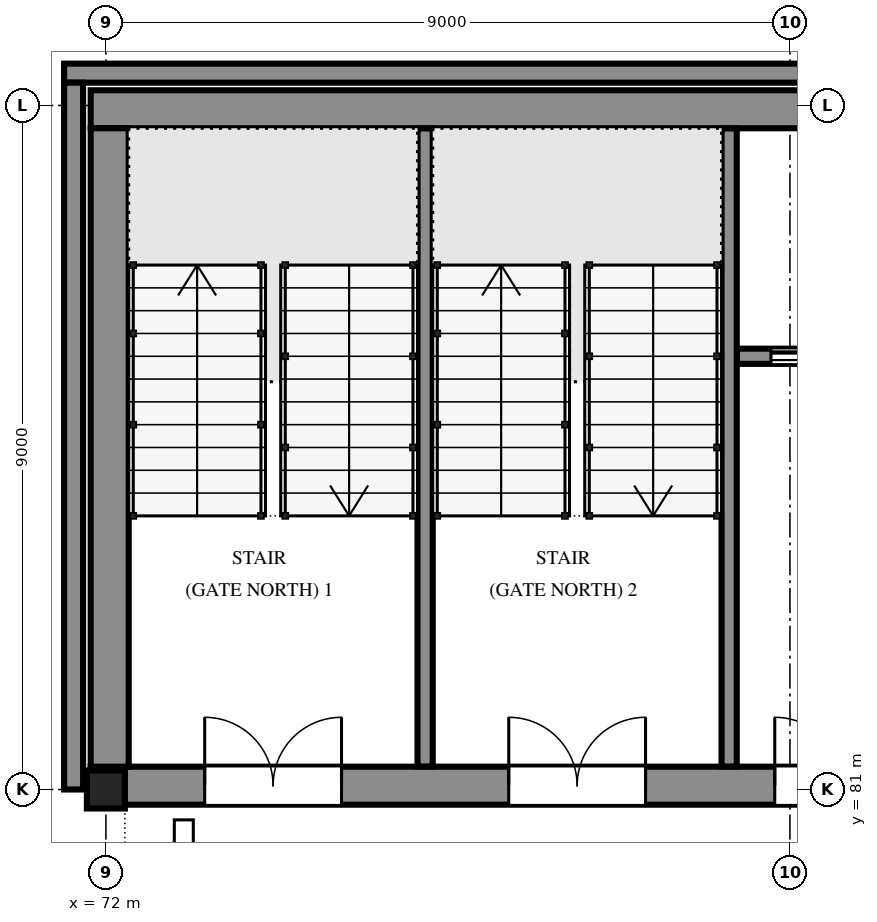
"""IFC4 building model, lengths in metres.
Left out: names, types, materials, properties, quantities, classifications, styles, units other than length and angle.
Written with IfcOpenShell. Run it as: python <this file> out.ifc"""

import sys

from ifc_helpers import new_model, si_unit, direction, frame, frame_2d, origin, origin_2d, place, context, subcontext, project, spatial, polyline, rectangle, hollow_rectangle, outline, extrude, element, fill, save


model = new_model("IFC4")
c1 = context("Model", 3, precision=1e-05, world=origin(), true_north=direction((0.0, 1.0)))
c2 = subcontext(c1, "Body", "Model", "MODEL_VIEW")
j1 = project(units=[si_unit("LENGTHUNIT", "METRE"), si_unit("PLANEANGLEUNIT", "RADIAN")], contexts=[c1])
p1 = place(None, origin())
s1 = spatial("IfcSite", under=j1, at=p1, CompositionType="ELEMENT")
p2 = place(p1, origin())
s2 = spatial("IfcBuilding", under=s1, at=p2, CompositionType="ELEMENT")
p3 = place(p2, frame((0.0, 0.0, 15.9)))
s3 = spatial("IfcBuildingStorey", under=s2, at=p3, CompositionType="ELEMENT", Elevation=15.9)
p4 = place(p3, frame((72.0, 81.0, 0.0), z_axis=(0.0, 0.0, 1.0), x_axis=(1.0, 0.0, 0.0)))
e1 = element("IfcColumn", 1, at=p4, inside=s3, PredefinedType="COLUMN", context=c2, shape_type="SweptSolid", body=[
    extrude(hollow_rectangle(XDim=0.5, YDim=0.5, WallThickness=0.032, at=origin_2d()), origin(), (0.0, 0.0, 1.0), 4.2),
])
p5 = place(p3, frame((71.8, 81.05, 0.0), z_axis=(0.0, 0.0, 1.0), x_axis=(1.0, 0.0, 0.0)))
e2 = element("IfcWall", 2, at=p5, inside=s3, PredefinedType="SOLIDWALL", context=c2, shape_type="SweptSolid", body=[
    extrude(rectangle(XDim=18.4, YDim=0.5, at=frame_2d((9.2, 0.0))), origin(), (0.0, 0.0, 1.0), 4.2),
])
p6 = place(p5, frame((1.5, 0.0, 0.0)))
e3 = element("IfcOpeningElement", 3, at=p6, cuts=e2, PredefinedType="OPENING", context=c2, shape_type="SweptSolid", body=[
    extrude(rectangle(XDim=1.8, YDim=2.1, at=frame_2d((0.9, 1.05))), frame((0.0, 0.26, 0.0), z_axis=(0.0, -1.0, 0.0), x_axis=(1.0, 0.0, 0.0)), (0.0, 0.0, 1.0), 0.52),
])
p7 = place(p5, frame((5.5, 0.0, 0.0)))
e4 = element("IfcOpeningElement", 4, at=p7, cuts=e2, PredefinedType="OPENING", context=c2, shape_type="SweptSolid", body=[
    extrude(rectangle(XDim=1.8, YDim=2.1, at=frame_2d((0.9, 1.05))), frame((0.0, 0.26, 0.0), z_axis=(0.0, -1.0, 0.0), x_axis=(1.0, 0.0, 0.0)), (0.0, 0.0, 1.0), 0.52),
])
p8 = place(p5, frame((9.0, 0.0, 0.0)))
e5 = element("IfcOpeningElement", 5, at=p8, cuts=e2, PredefinedType="OPENING", context=c2, shape_type="SweptSolid", body=[
    extrude(rectangle(XDim=1.8, YDim=2.1, at=frame_2d((0.9, 1.05))), frame((0.0, 0.26, 0.0), z_axis=(0.0, -1.0, 0.0), x_axis=(1.0, 0.0, 0.0)), (0.0, 0.0, 1.0), 0.52),
])
p9 = place(p5, frame((16.15, 0.0, 0.0)))
e6 = element("IfcOpeningElement", 6, at=p9, cuts=e2, PredefinedType="OPENING", context=c2, shape_type="SweptSolid", body=[
    extrude(rectangle(XDim=0.9, YDim=2.1, at=frame_2d((0.45, 1.05))), frame((0.0, 0.26, 0.0), z_axis=(0.0, -1.0, 0.0), x_axis=(1.0, 0.0, 0.0)), (0.0, 0.0, 1.0), 0.52),
])
p10 = place(p3, frame((71.8, 89.95, 0.0), z_axis=(0.0, 0.0, 1.0), x_axis=(1.0, 0.0, 0.0)))
e7 = element("IfcWall", 7, at=p10, inside=s3, PredefinedType="SOLIDWALL", context=c2, shape_type="SweptSolid", body=[
    extrude(rectangle(XDim=18.4, YDim=0.5, at=frame_2d((9.2, 0.0))), origin(), (0.0, 0.0, 1.0), 4.2),
])
p11 = place(p3, frame((72.05, 81.3, 0.0), z_axis=(0.0, 0.0, 1.0), x_axis=(0.0, 1.0, 0.0)))
e8 = element("IfcWall", 8, at=p11, inside=s3, PredefinedType="SOLIDWALL", context=c2, shape_type="SweptSolid", body=[
    extrude(rectangle(XDim=8.4, YDim=0.5, at=frame_2d((4.2, 0.0))), origin(), (0.0, 0.0, 1.0), 4.2),
])
for number, where, z_axis, x_axis in (
    (9, (76.2, 81.302, -0.15), (0.0, 0.0, 1.0), (0.0, 1.0, 0.0)),
    (10, (80.2, 81.302, -0.15), (0.0, 0.0, 1.0), (0.0, 1.0, 0.0)),
):
    element("IfcWall", number, at=place(p3, frame(where, z_axis=z_axis, x_axis=x_axis)), inside=s3, PredefinedType="SOLIDWALL", context=c2, shape_type="SweptSolid", body=[
        extrude(rectangle(XDim=8.396, YDim=0.2, at=frame_2d((4.198, 0.0))), origin(), (0.0, 0.0, 1.0), 3.666),
    ])
p12 = place(p3, frame((80.302, 86.7, 0.0), z_axis=(0.0, 0.0, 1.0), x_axis=(1.0, 0.0, 0.0)))
e11 = element("IfcWall", 11, at=p12, inside=s3, PredefinedType="SOLIDWALL", context=c2, shape_type="SweptSolid", body=[
    extrude(rectangle(XDim=2.198, YDim=0.2, at=frame_2d((1.099, 0.0))), origin(), (0.0, 0.0, 1.0), 3.516),
])
p13 = place(p12, frame((0.448, 0.0, 0.0)))
e12 = element("IfcOpeningElement", 12, at=p13, cuts=e11, PredefinedType="OPENING", context=c2, shape_type="SweptSolid", body=[
    extrude(rectangle(XDim=1.1, YDim=2.1, at=frame_2d((0.55, 1.05))), frame((0.0, 0.11, 0.0), z_axis=(0.0, -1.0, 0.0), x_axis=(1.0, 0.0, 0.0)), (0.0, 0.0, 1.0), 0.22),
])
p14 = place(p13, origin())
e13 = element("IfcDoor", 13, at=p14, inside=s3, OperationType="SLIDING_TO_LEFT", PredefinedType="DOOR", context=c2, shape_type="SweptSolid", body=[
    extrude(outline(polyline([(0.0, 0.0), (0.07, 0.0), (0.07, 2.03), (1.03, 2.03), (1.03, 0.0), (1.1, 0.0), (1.1, 2.1), (0.0, 2.1), (0.0, 0.0)])), frame((0.0, 0.025, 0.0), z_axis=(0.0, -1.0, 0.0), x_axis=(1.0, 0.0, 0.0)), (0.0, 0.0, 1.0), 0.05),
    extrude(rectangle(XDim=0.524, YDim=2.016, at=frame_2d((0.336, 1.018))), frame((0.0, 0.018, 0.0), z_axis=(0.0, -1.0, 0.0), x_axis=(1.0, 0.0, 0.0)), (0.0, 0.0, 1.0), 0.016),
    extrude(rectangle(XDim=0.52, YDim=2.016, at=frame_2d((0.766, 1.018))), frame((0.0, -0.002, 0.0), z_axis=(0.0, -1.0, 0.0), x_axis=(1.0, 0.0, 0.0)), (0.0, 0.0, 1.0), 0.016),
])
fill(e12, e13)
p15 = place(p6, origin())
e14 = element("IfcDoor", 14, at=p15, inside=s3, OperationType="DOUBLE_DOOR_SINGLE_SWING", PredefinedType="DOOR", context=c2, shape_type="SweptSolid", body=[
    extrude(outline(polyline([(0.0, 0.0), (0.07, 0.0), (0.07, 2.03), (1.73, 2.03), (1.73, 0.0), (1.8, 0.0), (1.8, 2.1), (0.0, 2.1), (0.0, 0.0)])), frame((0.0, 0.025, 0.0), z_axis=(0.0, -1.0, 0.0), x_axis=(1.0, 0.0, 0.0)), (0.0, 0.0, 1.0), 0.05),
    extrude(outline(polyline([(0.074, 0.01), (0.897, 0.01), (0.897, 2.026), (0.074, 2.026), (0.074, 0.01)]), holes=[polyline([(0.194, 0.16), (0.777, 0.16), (0.777, 1.01), (0.194, 1.01), (0.194, 0.16)]), polyline([(0.335, 1.16), (0.635, 1.16), (0.635, 1.76), (0.335, 1.76), (0.335, 1.16)])]), frame((0.0, 0.017, 0.0), z_axis=(0.0, -1.0, 0.0), x_axis=(1.0, 0.0, 0.0)), (0.0, 0.0, 1.0), 0.035),
    extrude(rectangle(XDim=0.583, YDim=0.85, at=frame_2d((0.485, 0.585))), frame((0.0, 0.009, 0.0), z_axis=(0.0, -1.0, 0.0), x_axis=(1.0, 0.0, 0.0)), (0.0, 0.0, 1.0), 0.017),
    extrude(rectangle(XDim=0.3, YDim=0.6, at=frame_2d((0.485, 1.46))), frame((0.0, 0.006, 0.0), z_axis=(0.0, -1.0, 0.0), x_axis=(1.0, 0.0, 0.0)), (0.0, 0.0, 1.0), 0.012),
    extrude(outline(polyline([(0.903, 0.01), (1.726, 0.01), (1.726, 2.026), (0.903, 2.026), (0.903, 0.01)]), holes=[polyline([(1.023, 0.16), (1.606, 0.16), (1.606, 1.01), (1.023, 1.01), (1.023, 0.16)]), polyline([(1.165, 1.16), (1.465, 1.16), (1.465, 1.76), (1.165, 1.76), (1.165, 1.16)])]), frame((0.0, 0.017, 0.0), z_axis=(0.0, -1.0, 0.0), x_axis=(1.0, 0.0, 0.0)), (0.0, 0.0, 1.0), 0.035),
    extrude(rectangle(XDim=0.583, YDim=0.85, at=frame_2d((1.314, 0.585))), frame((0.0, 0.009, 0.0), z_axis=(0.0, -1.0, 0.0), x_axis=(1.0, 0.0, 0.0)), (0.0, 0.0, 1.0), 0.017),
    extrude(rectangle(XDim=0.3, YDim=0.6, at=frame_2d((1.314, 1.46))), frame((0.0, 0.006, 0.0), z_axis=(0.0, -1.0, 0.0), x_axis=(1.0, 0.0, 0.0)), (0.0, 0.0, 1.0), 0.012),
])
fill(e3, e14)
p16 = place(p7, origin())
e15 = element("IfcDoor", 15, at=p16, inside=s3, OperationType="DOUBLE_DOOR_SINGLE_SWING", PredefinedType="DOOR", context=c2, shape_type="SweptSolid", body=[
    extrude(outline(polyline([(0.0, 0.0), (0.07, 0.0), (0.07, 2.03), (1.73, 2.03), (1.73, 0.0), (1.8, 0.0), (1.8, 2.1), (0.0, 2.1), (0.0, 0.0)])), frame((0.0, 0.025, 0.0), z_axis=(0.0, -1.0, 0.0), x_axis=(1.0, 0.0, 0.0)), (0.0, 0.0, 1.0), 0.05),
    extrude(outline(polyline([(0.074, 0.01), (0.897, 0.01), (0.897, 2.026), (0.074, 2.026), (0.074, 0.01)]), holes=[polyline([(0.194, 0.16), (0.777, 0.16), (0.777, 1.01), (0.194, 1.01), (0.194, 0.16)]), polyline([(0.335, 1.16), (0.635, 1.16), (0.635, 1.76), (0.335, 1.76), (0.335, 1.16)])]), frame((0.0, 0.017, 0.0), z_axis=(0.0, -1.0, 0.0), x_axis=(1.0, 0.0, 0.0)), (0.0, 0.0, 1.0), 0.035),
    extrude(rectangle(XDim=0.583, YDim=0.85, at=frame_2d((0.485, 0.585))), frame((0.0, 0.009, 0.0), z_axis=(0.0, -1.0, 0.0), x_axis=(1.0, 0.0, 0.0)), (0.0, 0.0, 1.0), 0.017),
    extrude(rectangle(XDim=0.3, YDim=0.6, at=frame_2d((0.485, 1.46))), frame((0.0, 0.006, 0.0), z_axis=(0.0, -1.0, 0.0), x_axis=(1.0, 0.0, 0.0)), (0.0, 0.0, 1.0), 0.012),
    extrude(outline(polyline([(0.903, 0.01), (1.726, 0.01), (1.726, 2.026), (0.903, 2.026), (0.903, 0.01)]), holes=[polyline([(1.023, 0.16), (1.606, 0.16), (1.606, 1.01), (1.023, 1.01), (1.023, 0.16)]), polyline([(1.165, 1.16), (1.465, 1.16), (1.465, 1.76), (1.165, 1.76), (1.165, 1.16)])]), frame((0.0, 0.017, 0.0), z_axis=(0.0, -1.0, 0.0), x_axis=(1.0, 0.0, 0.0)), (0.0, 0.0, 1.0), 0.035),
    extrude(rectangle(XDim=0.583, YDim=0.85, at=frame_2d((1.314, 0.585))), frame((0.0, 0.009, 0.0), z_axis=(0.0, -1.0, 0.0), x_axis=(1.0, 0.0, 0.0)), (0.0, 0.0, 1.0), 0.017),
    extrude(rectangle(XDim=0.3, YDim=0.6, at=frame_2d((1.314, 1.46))), frame((0.0, 0.006, 0.0), z_axis=(0.0, -1.0, 0.0), x_axis=(1.0, 0.0, 0.0)), (0.0, 0.0, 1.0), 0.012),
])
fill(e4, e15)
p17 = place(p8, origin())
e16 = element("IfcDoor", 16, at=p17, inside=s3, OperationType="DOUBLE_DOOR_SINGLE_SWING", PredefinedType="DOOR", context=c2, shape_type="SweptSolid", body=[
    extrude(outline(polyline([(0.0, 0.0), (0.07, 0.0), (0.07, 2.03), (1.73, 2.03), (1.73, 0.0), (1.8, 0.0), (1.8, 2.1), (0.0, 2.1), (0.0, 0.0)])), frame((0.0, 0.025, 0.0), z_axis=(0.0, -1.0, 0.0), x_axis=(1.0, 0.0, 0.0)), (0.0, 0.0, 1.0), 0.05),
    extrude(outline(polyline([(0.074, 0.01), (0.897, 0.01), (0.897, 2.026), (0.074, 2.026), (0.074, 0.01)]), holes=[polyline([(0.194, 0.16), (0.777, 0.16), (0.777, 1.01), (0.194, 1.01), (0.194, 0.16)]), polyline([(0.335, 1.16), (0.635, 1.16), (0.635, 1.76), (0.335, 1.76), (0.335, 1.16)])]), frame((0.0, 0.017, 0.0), z_axis=(0.0, -1.0, 0.0), x_axis=(1.0, 0.0, 0.0)), (0.0, 0.0, 1.0), 0.035),
    extrude(rectangle(XDim=0.583, YDim=0.85, at=frame_2d((0.485, 0.585))), frame((0.0, 0.009, 0.0), z_axis=(0.0, -1.0, 0.0), x_axis=(1.0, 0.0, 0.0)), (0.0, 0.0, 1.0), 0.017),
    extrude(rectangle(XDim=0.3, YDim=0.6, at=frame_2d((0.485, 1.46))), frame((0.0, 0.006, 0.0), z_axis=(0.0, -1.0, 0.0), x_axis=(1.0, 0.0, 0.0)), (0.0, 0.0, 1.0), 0.012),
    extrude(outline(polyline([(0.903, 0.01), (1.726, 0.01), (1.726, 2.026), (0.903, 2.026), (0.903, 0.01)]), holes=[polyline([(1.023, 0.16), (1.606, 0.16), (1.606, 1.01), (1.023, 1.01), (1.023, 0.16)]), polyline([(1.165, 1.16), (1.465, 1.16), (1.465, 1.76), (1.165, 1.76), (1.165, 1.16)])]), frame((0.0, 0.017, 0.0), z_axis=(0.0, -1.0, 0.0), x_axis=(1.0, 0.0, 0.0)), (0.0, 0.0, 1.0), 0.035),
    extrude(rectangle(XDim=0.583, YDim=0.85, at=frame_2d((1.314, 0.585))), frame((0.0, 0.009, 0.0), z_axis=(0.0, -1.0, 0.0), x_axis=(1.0, 0.0, 0.0)), (0.0, 0.0, 1.0), 0.017),
    extrude(rectangle(XDim=0.3, YDim=0.6, at=frame_2d((1.314, 1.46))), frame((0.0, 0.006, 0.0), z_axis=(0.0, -1.0, 0.0), x_axis=(1.0, 0.0, 0.0)), (0.0, 0.0, 1.0), 0.012),
])
fill(e5, e16)
save(model, sys.argv[1])
